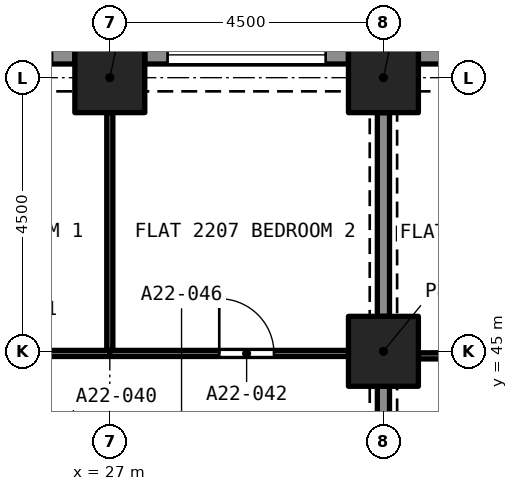
"""IFC4 building model, lengths in metres.
Left out: names, types, materials, properties, quantities, classifications, styles, units other than length and angle.
Written with IfcOpenShell. Run it as: python <this file> out.ifc"""

import sys

from ifc_helpers import new_model, si_unit, direction, frame, frame_2d, origin, origin_2d, place, context, subcontext, project, spatial, rectangle, extrude, element, fill, save


model = new_model("IFC4")
c1 = context("Model", 3, precision=1e-05, world=origin(), true_north=direction((0.0, 1.0)))
c2 = subcontext(c1, "Body", "Model", "MODEL_VIEW")
j1 = project(units=[si_unit("LENGTHUNIT", "METRE"), si_unit("PLANEANGLEUNIT", "RADIAN")], contexts=[c1])
p1 = place(None, origin())
s1 = spatial("IfcSite", under=j1, at=p1, CompositionType="ELEMENT")
p2 = place(p1, origin())
s2 = spatial("IfcBuilding", under=s1, at=p2, CompositionType="ELEMENT")
p3 = place(p2, frame((0.0, 0.0, 83.2)))
s3 = spatial("IfcBuildingStorey", under=s2, at=p3, CompositionType="ELEMENT", Elevation=83.2)
for number, where, z_axis, x_axis in (
    (1, (31.5, 45.0, 0.0), (0.0, 0.0, 1.0), (1.0, 0.0, 0.0)),
    (2, (27.0, 49.5, 0.0), (0.0, 0.0, 1.0), (1.0, 0.0, 0.0)),
    (3, (31.5, 49.5, 0.0), (0.0, 0.0, 1.0), (1.0, 0.0, 0.0)),
):
    element("IfcColumn", number, at=place(p3, frame(where, z_axis=z_axis, x_axis=x_axis)), inside=s3, PredefinedType="COLUMN", context=c2, shape_type="SweptSolid", body=[
        extrude(rectangle(XDim=1.15, YDim=1.15, at=origin_2d()), origin(), (0.0, 0.0, 1.0), 3.2),
    ])
p4 = place(p3, frame((32.075, 49.875, 0.0), z_axis=(0.0, 0.0, 1.0), x_axis=(1.0, 0.0, 0.0)))
e4 = element("IfcWall", 4, at=p4, inside=s3, PredefinedType="SOLIDWALL", context=c2, shape_type="SweptSolid", body=[
    extrude(rectangle(XDim=3.35, YDim=0.3, at=frame_2d((1.675, 0.0))), origin(), (0.0, 0.0, 1.0), 3.2),
])
p5 = place(p4, frame((0.375, 0.0, 0.45)))
e5 = element("IfcOpeningElement", 5, at=p5, cuts=e4, PredefinedType="OPENING", context=c2, shape_type="SweptSolid", body=[
    extrude(rectangle(XDim=2.6, YDim=1.95, at=frame_2d((1.3, 0.975))), frame((0.0, 0.16, 0.0), z_axis=(0.0, -1.0, 0.0), x_axis=(1.0, 0.0, 0.0)), (0.0, 0.0, 1.0), 0.32),
])
p6 = place(p3, frame((27.575, 49.875, 0.0), z_axis=(0.0, 0.0, 1.0), x_axis=(1.0, 0.0, 0.0)))
e6 = element("IfcWall", 6, at=p6, inside=s3, PredefinedType="SOLIDWALL", context=c2, shape_type="SweptSolid", body=[
    extrude(rectangle(XDim=3.35, YDim=0.3, at=frame_2d((1.675, 0.0))), origin(), (0.0, 0.0, 1.0), 3.2),
])
p7 = place(p6, frame((0.375, 0.0, 0.45)))
e7 = element("IfcOpeningElement", 7, at=p7, cuts=e6, PredefinedType="OPENING", context=c2, shape_type="SweptSolid", body=[
    extrude(rectangle(XDim=2.6, YDim=1.95, at=frame_2d((1.3, 0.975))), frame((0.0, 0.16, 0.0), z_axis=(0.0, -1.0, 0.0), x_axis=(1.0, 0.0, 0.0)), (0.0, 0.0, 1.0), 0.32),
])
p8 = place(p3, frame((23.075, 49.875, 0.0), z_axis=(0.0, 0.0, 1.0), x_axis=(1.0, 0.0, 0.0)))
e8 = element("IfcWall", 8, at=p8, inside=s3, PredefinedType="SOLIDWALL", context=c2, shape_type="SweptSolid", body=[
    extrude(rectangle(XDim=3.35, YDim=0.3, at=frame_2d((1.675, 0.0))), origin(), (0.0, 0.0, 1.0), 3.2),
])
p9 = place(p8, frame((0.375, 0.0, 0.45)))
e9 = element("IfcOpeningElement", 9, at=p9, cuts=e8, PredefinedType="OPENING", context=c2, shape_type="SweptSolid", body=[
    extrude(rectangle(XDim=2.6, YDim=1.95, at=frame_2d((1.3, 0.975))), frame((0.0, 0.16, 0.0), z_axis=(0.0, -1.0, 0.0), x_axis=(1.0, 0.0, 0.0)), (0.0, 0.0, 1.0), 0.32),
])
p10 = place(p3, frame((32.075, 44.925, 0.0), z_axis=(0.0, 0.0, 1.0), x_axis=(1.0, 0.0, 0.0)))
e10 = element("IfcWall", 10, at=p10, inside=s3, PredefinedType="PARTITIONING", context=c2, shape_type="SweptSolid", body=[
    extrude(rectangle(XDim=3.925, YDim=0.1, at=frame_2d((1.962, 0.0))), origin(), (0.0, 0.0, 1.0), 2.9),
])
p11 = place(p10, frame((1.175, 0.0, 0.0)))
e11 = element("IfcOpeningElement", 11, at=p11, cuts=e10, PredefinedType="OPENING", context=c2, shape_type="SweptSolid", body=[
    extrude(rectangle(XDim=1.0, YDim=2.1, at=frame_2d((0.5, 1.05))), frame((0.0, 0.06, 0.0), z_axis=(0.0, -1.0, 0.0), x_axis=(1.0, 0.0, 0.0)), (0.0, 0.0, 1.0), 0.12),
])
for number, where, z_axis, x_axis in (
    (12, (31.5, 41.075, 0.0), (0.0, 0.0, 1.0), (0.0, 1.0, 0.0)),
    (13, (31.5, 45.575, 0.0), (0.0, 0.0, 1.0), (0.0, 1.0, 0.0)),
):
    element("IfcWall", number, at=place(p3, frame(where, z_axis=z_axis, x_axis=x_axis)), inside=s3, PredefinedType="PARTITIONING", context=c2, shape_type="SweptSolid", body=[
        extrude(rectangle(XDim=3.35, YDim=0.2, at=frame_2d((1.675, 0.0))), origin(), (0.0, 0.0, 1.0), 2.38),
    ])
p12 = place(p3, frame((27.0, 45.015, 0.0), z_axis=(0.0, 0.0, 1.0), x_axis=(0.0, 1.0, 0.0)))
e14 = element("IfcWall", 14, at=p12, inside=s3, PredefinedType="PARTITIONING", context=c2, shape_type="SweptSolid", body=[
    extrude(rectangle(XDim=3.91, YDim=0.1, at=frame_2d((1.955, 0.0))), origin(), (0.0, 0.0, 1.0), 2.75),
])
p13 = place(p3, frame((22.5, 44.965, 0.0), z_axis=(0.0, 0.0, 1.0), x_axis=(1.0, 0.0, 0.0)))
e15 = element("IfcWall", 15, at=p13, inside=s3, PredefinedType="PARTITIONING", context=c2, shape_type="SweptSolid", body=[
    extrude(rectangle(XDim=4.5, YDim=0.1, at=frame_2d((2.25, 0.0))), origin(), (0.0, 0.0, 1.0), 2.75),
])
p14 = place(p13, frame((1.8, 0.0, 0.0)))
e16 = element("IfcOpeningElement", 16, at=p14, cuts=e15, PredefinedType="OPENING", context=c2, shape_type="SweptSolid", body=[
    extrude(rectangle(XDim=0.9, YDim=2.1, at=frame_2d((0.45, 1.05))), frame((0.0, 0.06, 0.0), z_axis=(0.0, -1.0, 0.0), x_axis=(1.0, 0.0, 0.0)), (0.0, 0.0, 1.0), 0.12),
])
p15 = place(p3, frame((27.0, 44.965, 0.0), z_axis=(0.0, 0.0, 1.0), x_axis=(1.0, 0.0, 0.0)))
e17 = element("IfcWall", 17, at=p15, inside=s3, PredefinedType="PARTITIONING", context=c2, shape_type="SweptSolid", body=[
    extrude(rectangle(XDim=3.925, YDim=0.1, at=frame_2d((1.962, 0.0))), origin(), (0.0, 0.0, 1.0), 2.75),
])
p16 = place(p15, frame((1.8, 0.0, 0.0)))
e18 = element("IfcOpeningElement", 18, at=p16, cuts=e17, PredefinedType="OPENING", context=c2, shape_type="SweptSolid", body=[
    extrude(rectangle(XDim=0.9, YDim=2.1, at=frame_2d((0.45, 1.05))), frame((0.0, 0.06, 0.0), z_axis=(0.0, -1.0, 0.0), x_axis=(1.0, 0.0, 0.0)), (0.0, 0.0, 1.0), 0.12),
])
p17 = place(p7, origin())
e19 = element("IfcWindow", 19, at=p17, inside=s3, PartitioningType="SINGLE_PANEL", PredefinedType="WINDOW", context=c2, shape_type="SweptSolid", body=[
    extrude(rectangle(XDim=2.6, YDim=1.95, at=frame_2d((1.3, 0.975))), frame((0.0, 0.03, 0.0), z_axis=(0.0, -1.0, 0.0), x_axis=(1.0, 0.0, 0.0)), (0.0, 0.0, 1.0), 0.06),
])
fill(e7, e19)
p18 = place(p16, origin())
e20 = element("IfcDoor", 20, at=p18, inside=s3, OperationType="SINGLE_SWING_RIGHT", PredefinedType="DOOR", context=c2, shape_type="SweptSolid", body=[
    extrude(rectangle(XDim=0.9, YDim=2.1, at=frame_2d((0.45, 1.05))), frame((0.0, 0.025, 0.0), z_axis=(0.0, -1.0, 0.0), x_axis=(1.0, 0.0, 0.0)), (0.0, 0.0, 1.0), 0.05),
])
fill(e18, e20)
save(model, sys.argv[1])
